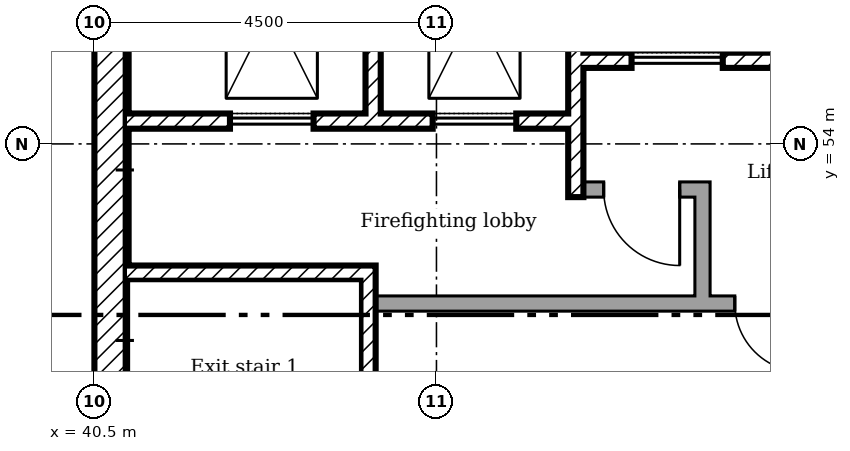
"""IFC4 building model, lengths in metres.
Left out: names, types, materials, properties, quantities, classifications, styles, units other than length and angle.
Written with IfcOpenShell. Run it as: python <this file> out.ifc"""

import sys

from ifc_helpers import new_model, si_unit, direction, frame, frame_2d, origin, place, context, subcontext, project, spatial, rectangle, extrude, element, fill, save


model = new_model("IFC4")
c1 = context("Model", 3, precision=1e-05, world=origin(), true_north=direction((0.0, 1.0)))
c2 = subcontext(c1, "Body", "Model", "MODEL_VIEW")
j1 = project(units=[si_unit("LENGTHUNIT", "METRE"), si_unit("PLANEANGLEUNIT", "RADIAN")], contexts=[c1])
p1 = place(None, origin())
s1 = spatial("IfcSite", under=j1, at=p1, CompositionType="ELEMENT")
p2 = place(p1, origin())
s2 = spatial("IfcBuilding", under=s1, at=p2, CompositionType="ELEMENT")
p3 = place(p2, frame((0.0, 0.0, 251.0)))
s3 = spatial("IfcBuildingStorey", under=s2, at=p3, CompositionType="ELEMENT", Elevation=251.0)
p4 = place(p3, frame((40.725, 40.95, 0.0), z_axis=(0.0, 0.0, 1.0), x_axis=(0.0, 1.0, 0.0)))
e1 = element("IfcWall", 1, at=p4, inside=s3, PredefinedType="SHEAR", context=c2, shape_type="SweptSolid", body=[
    extrude(rectangle(XDim=17.1, YDim=0.45, at=frame_2d((8.55, 0.0))), origin(), (0.0, 0.0, 1.0), 3.78),
])
p5 = place(p3, frame((44.167, 58.05, 0.0), z_axis=(0.0, 0.0, 1.0), x_axis=(0.0, -1.0, 0.0)))
e2 = element("IfcWall", 2, at=p5, inside=s3, PredefinedType="SHEAR", context=c2, shape_type="SweptSolid", body=[
    extrude(rectangle(XDim=3.65, YDim=0.2, at=frame_2d((1.825, 0.0))), origin(), (0.0, 0.0, 1.0), 3.78),
])
p6 = place(p3, frame((46.833, 58.05, 0.0), z_axis=(0.0, 0.0, 1.0), x_axis=(0.0, -1.0, 0.0)))
e3 = element("IfcWall", 3, at=p6, inside=s3, PredefinedType="SHEAR", context=c2, shape_type="SweptSolid", body=[
    extrude(rectangle(XDim=4.75, YDim=0.2, at=frame_2d((2.375, 0.0))), origin(), (0.0, 0.0, 1.0), 3.78),
])
p7 = place(p3, frame((48.5, 51.9, 0.0), z_axis=(0.0, 0.0, 1.0), x_axis=(0.0, 1.0, 0.0)))
e4 = element("IfcWall", 4, at=p7, inside=s3, PredefinedType="PARTITIONING", context=c2, shape_type="SweptSolid", body=[
    extrude(rectangle(XDim=1.6, YDim=0.2, at=frame_2d((0.8, 0.0))), origin(), (0.0, 0.0, 1.0), 3.78),
])
p8 = place(p3, frame((46.933, 53.4, 0.0)))
e5 = element("IfcWall", 5, at=p8, inside=s3, PredefinedType="PARTITIONING", context=c2, shape_type="SweptSolid", body=[
    extrude(rectangle(XDim=1.467, YDim=0.2, at=frame_2d((0.733, 0.0))), origin(), (0.0, 0.0, 1.0), 3.78),
])
p9 = place(p8, frame((0.267, 0.0, 0.0)))
e6 = element("IfcOpeningElement", 6, at=p9, cuts=e5, PredefinedType="OPENING", context=c2, shape_type="SweptSolid", body=[
    extrude(rectangle(XDim=1.0, YDim=2.1, at=frame_2d((0.5, 1.05))), frame((0.0, 0.11, 0.0), z_axis=(0.0, -1.0, 0.0), x_axis=(1.0, 0.0, 0.0)), (0.0, 0.0, 1.0), 0.22),
])
p10 = place(p3, frame((46.933, 55.1, 0.0)))
e7 = element("IfcWall", 7, at=p10, inside=s3, PredefinedType="SHEAR", context=c2, shape_type="SweptSolid", body=[
    extrude(rectangle(XDim=11.117, YDim=0.2, at=frame_2d((5.558, 0.0))), origin(), (0.0, 0.0, 1.0), 3.78),
])
p11 = place(p10, frame((8.833, 0.0, 0.0)))
e8 = element("IfcOpeningElement", 8, at=p11, cuts=e7, PredefinedType="OPENING", context=c2, shape_type="SweptSolid", body=[
    extrude(rectangle(XDim=0.9, YDim=2.1, at=frame_2d((0.45, 1.05))), frame((0.0, 0.11, 0.0), z_axis=(0.0, -1.0, 0.0), x_axis=(1.0, 0.0, 0.0)), (0.0, 0.0, 1.0), 0.22),
])
p12 = place(p10, frame((0.633, 0.0, 0.0)))
e9 = element("IfcOpeningElement", 9, at=p12, cuts=e7, PredefinedType="OPENING", context=c2, shape_type="SweptSolid", body=[
    extrude(rectangle(XDim=1.2, YDim=2.1, at=frame_2d((0.6, 1.05))), frame((0.0, 0.11, 0.0), z_axis=(0.0, -1.0, 0.0), x_axis=(1.0, 0.0, 0.0)), (0.0, 0.0, 1.0), 0.22),
])
p13 = place(p10, frame((3.3, 0.0, 0.0)))
e10 = element("IfcOpeningElement", 10, at=p13, cuts=e7, PredefinedType="OPENING", context=c2, shape_type="SweptSolid", body=[
    extrude(rectangle(XDim=1.2, YDim=2.1, at=frame_2d((0.6, 1.05))), frame((0.0, 0.11, 0.0), z_axis=(0.0, -1.0, 0.0), x_axis=(1.0, 0.0, 0.0)), (0.0, 0.0, 1.0), 0.22),
])
p14 = place(p10, frame((5.967, 0.0, 0.0)))
e11 = element("IfcOpeningElement", 11, at=p14, cuts=e7, PredefinedType="OPENING", context=c2, shape_type="SweptSolid", body=[
    extrude(rectangle(XDim=1.2, YDim=2.1, at=frame_2d((0.6, 1.05))), frame((0.0, 0.11, 0.0), z_axis=(0.0, -1.0, 0.0), x_axis=(1.0, 0.0, 0.0)), (0.0, 0.0, 1.0), 0.22),
])
p15 = place(p3, frame((40.95, 54.3, 0.0)))
e12 = element("IfcWall", 12, at=p15, inside=s3, PredefinedType="SHEAR", context=c2, shape_type="SweptSolid", body=[
    extrude(rectangle(XDim=5.783, YDim=0.2, at=frame_2d((2.892, 0.0))), origin(), (0.0, 0.0, 1.0), 3.78),
])
p16 = place(p15, frame((1.333, 0.0, 0.0)))
e13 = element("IfcOpeningElement", 13, at=p16, cuts=e12, PredefinedType="OPENING", context=c2, shape_type="SweptSolid", body=[
    extrude(rectangle(XDim=1.1, YDim=2.1, at=frame_2d((0.55, 1.05))), frame((0.0, 0.11, 0.0), z_axis=(0.0, -1.0, 0.0), x_axis=(1.0, 0.0, 0.0)), (0.0, 0.0, 1.0), 0.22),
])
p17 = place(p15, frame((4.0, 0.0, 0.0)))
e14 = element("IfcOpeningElement", 14, at=p17, cuts=e12, PredefinedType="OPENING", context=c2, shape_type="SweptSolid", body=[
    extrude(rectangle(XDim=1.1, YDim=2.1, at=frame_2d((0.55, 1.05))), frame((0.0, 0.11, 0.0), z_axis=(0.0, -1.0, 0.0), x_axis=(1.0, 0.0, 0.0)), (0.0, 0.0, 1.0), 0.22),
])
p18 = place(p3, frame((44.1, 45.5, 0.0), z_axis=(0.0, 0.0, 1.0), x_axis=(0.0, 1.0, 0.0)))
e15 = element("IfcWall", 15, at=p18, inside=s3, PredefinedType="SHEAR", context=c2, shape_type="SweptSolid", body=[
    extrude(rectangle(XDim=6.9, YDim=0.2, at=frame_2d((3.45, 0.0))), origin(), (0.0, 0.0, 1.0), 3.78),
])
p19 = place(p3, frame((40.95, 52.3, 0.0)))
e16 = element("IfcWall", 16, at=p19, inside=s3, PredefinedType="SHEAR", context=c2, shape_type="SweptSolid", body=[
    extrude(rectangle(XDim=3.05, YDim=0.2, at=frame_2d((1.525, 0.0))), origin(), (0.0, 0.0, 1.0), 3.78),
])
p20 = place(p3, frame((44.2, 51.9, 0.0)))
e17 = element("IfcWall", 17, at=p20, inside=s3, PredefinedType="PARTITIONING", context=c2, shape_type="SweptSolid", body=[
    extrude(rectangle(XDim=10.6, YDim=0.2, at=frame_2d((5.3, 0.0))), origin(), (0.0, 0.0, 1.0), 3.78),
])
p21 = place(p20, frame((4.725, 0.0, 0.0)))
e18 = element("IfcOpeningElement", 18, at=p21, cuts=e17, PredefinedType="OPENING", context=c2, shape_type="SweptSolid", body=[
    extrude(rectangle(XDim=0.9, YDim=2.1, at=frame_2d((0.45, 1.05))), frame((0.0, 0.11, 0.0), z_axis=(0.0, -1.0, 0.0), x_axis=(1.0, 0.0, 0.0)), (0.0, 0.0, 1.0), 0.22),
])
p22 = place(p20, frame((7.8, 0.0, 0.0)))
e19 = element("IfcOpeningElement", 19, at=p22, cuts=e17, PredefinedType="OPENING", context=c2, shape_type="SweptSolid", body=[
    extrude(rectangle(XDim=0.9, YDim=2.1, at=frame_2d((0.45, 1.05))), frame((0.0, 0.11, 0.0), z_axis=(0.0, -1.0, 0.0), x_axis=(1.0, 0.0, 0.0)), (0.0, 0.0, 1.0), 0.22),
])
p23 = place(p9, frame((1.0, 0.0, 0.0), x_axis=(-1.0, 0.0, 0.0)))
e20 = element("IfcDoor", 20, at=p23, inside=s3, OperationType="SINGLE_SWING_RIGHT", PredefinedType="DOOR", context=c2, shape_type="SweptSolid", body=[
    extrude(rectangle(XDim=1.0, YDim=2.1, at=frame_2d((0.5, 1.05))), frame((0.0, 0.025, 0.0), z_axis=(0.0, -1.0, 0.0), x_axis=(1.0, 0.0, 0.0)), (0.0, 0.0, 1.0), 0.05),
])
fill(e6, e20)
p24 = place(p21, frame((0.9, 0.0, 0.0), x_axis=(-1.0, 0.0, 0.0)))
e21 = element("IfcDoor", 21, at=p24, inside=s3, OperationType="SINGLE_SWING_RIGHT", PredefinedType="DOOR", context=c2, shape_type="SweptSolid", body=[
    extrude(rectangle(XDim=0.9, YDim=2.1, at=frame_2d((0.45, 1.05))), frame((0.0, 0.025, 0.0), z_axis=(0.0, -1.0, 0.0), x_axis=(1.0, 0.0, 0.0)), (0.0, 0.0, 1.0), 0.05),
])
fill(e18, e21)
p25 = place(p16, origin())
e22 = element("IfcDoor", 22, at=p25, inside=s3, OperationType="SLIDING_TO_LEFT", PredefinedType="DOOR", context=c2, shape_type="SweptSolid", body=[
    extrude(rectangle(XDim=1.1, YDim=2.1, at=frame_2d((0.55, 1.05))), frame((0.0, 0.025, 0.0), z_axis=(0.0, -1.0, 0.0), x_axis=(1.0, 0.0, 0.0)), (0.0, 0.0, 1.0), 0.05),
])
fill(e13, e22)
p26 = place(p17, origin())
e23 = element("IfcDoor", 23, at=p26, inside=s3, OperationType="SLIDING_TO_LEFT", PredefinedType="DOOR", context=c2, shape_type="SweptSolid", body=[
    extrude(rectangle(XDim=1.1, YDim=2.1, at=frame_2d((0.55, 1.05))), frame((0.0, 0.025, 0.0), z_axis=(0.0, -1.0, 0.0), x_axis=(1.0, 0.0, 0.0)), (0.0, 0.0, 1.0), 0.05),
])
fill(e14, e23)
p27 = place(p12, origin())
e24 = element("IfcDoor", 24, at=p27, inside=s3, OperationType="SLIDING_TO_LEFT", PredefinedType="DOOR", context=c2, shape_type="SweptSolid", body=[
    extrude(rectangle(XDim=1.2, YDim=2.1, at=frame_2d((0.6, 1.05))), frame((0.0, 0.025, 0.0), z_axis=(0.0, -1.0, 0.0), x_axis=(1.0, 0.0, 0.0)), (0.0, 0.0, 1.0), 0.05),
])
fill(e9, e24)
save(model, sys.argv[1])
